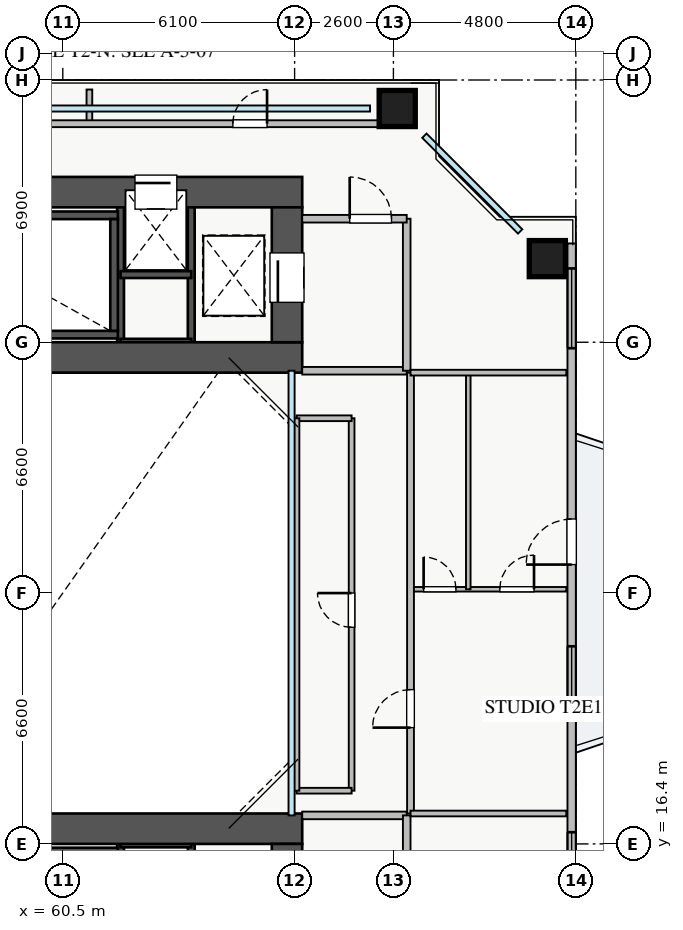
"""IFC4 building model, lengths in metres.
Left out: names, types, materials, properties, quantities, classifications, styles, units other than length and angle.
Written with IfcOpenShell. Run it as: python <this file> out.ifc"""

import sys

from ifc_helpers import new_model, si_unit, direction, frame, frame_2d, origin, origin_2d, place, context, subcontext, project, spatial, rectangle, extrude, source, transform, mapped, element, fill, save


model = new_model("IFC4")
c1 = context("Model", 3, precision=1e-05, world=origin(), true_north=direction((0.0, 1.0)))
c2 = subcontext(c1, "Body", "Model", "MODEL_VIEW")
j1 = project(units=[si_unit("LENGTHUNIT", "METRE"), si_unit("PLANEANGLEUNIT", "RADIAN")], contexts=[c1])
p1 = place(None, origin())
s1 = spatial("IfcSite", under=j1, at=p1, CompositionType="ELEMENT")
p2 = place(p1, origin())
s2 = spatial("IfcBuilding", under=s1, at=p2, CompositionType="ELEMENT")
p3 = place(p2, frame((0.0, 0.0, 50.25)))
s3 = spatial("IfcBuildingStorey", under=s2, at=p3, CompositionType="ELEMENT", Elevation=50.25)
for number, where, z_axis, x_axis in (
    (1, (62.02, 29.6, 0.0), (0.0, 0.0, 1.0), (0.0, 1.0, 0.0)),
    (2, (63.88, 29.6, 0.0), (0.0, 0.0, 1.0), (0.0, 1.0, 0.0)),
):
    element("IfcWall", number, at=place(p3, frame(where, z_axis=z_axis, x_axis=x_axis)), inside=s3, PredefinedType="SHEAR", context=c2, shape_type="SweptSolid", body=[
        extrude(rectangle(XDim=3.95, YDim=0.18, at=frame_2d((1.975, 0.0))), origin(), (0.0, 0.0, 1.0), 3.07),
    ])
for number, where, z_axis, x_axis in (
    (3, (62.02, 31.38, 0.0), (0.0, 0.0, 1.0), (1.0, 0.0, 0.0)),
    (4, (62.02, 29.6, 0.0), (0.0, 0.0, 1.0), (1.0, 0.0, 0.0)),
):
    element("IfcWall", number, at=place(p3, frame(where, z_axis=z_axis, x_axis=x_axis)), inside=s3, PredefinedType="SHEAR", context=c2, shape_type="SweptSolid", body=[
        extrude(rectangle(XDim=1.86, YDim=0.18, at=frame_2d((0.93, 0.0))), origin(), (0.0, 0.0, 1.0), 3.07),
    ])
for number, where, z_axis, x_axis in (
    (5, (62.02, 12.45, 0.0), (0.0, 0.0, 1.0), (0.0, 1.0, 0.0)),
    (6, (63.88, 12.45, 0.0), (0.0, 0.0, 1.0), (0.0, 1.0, 0.0)),
):
    element("IfcWall", number, at=place(p3, frame(where, z_axis=z_axis, x_axis=x_axis)), inside=s3, PredefinedType="SHEAR", context=c2, shape_type="SweptSolid", body=[
        extrude(rectangle(XDim=3.95, YDim=0.18, at=frame_2d((1.975, 0.0))), origin(), (0.0, 0.0, 1.0), 3.07),
    ])
p4 = place(p3, frame((62.02, 16.4, 0.0), z_axis=(0.0, 0.0, 1.0), x_axis=(1.0, 0.0, 0.0)))
e7 = element("IfcWall", 7, at=p4, inside=s3, PredefinedType="SHEAR", context=c2, shape_type="SweptSolid", body=[
    extrude(rectangle(XDim=1.86, YDim=0.18, at=frame_2d((0.93, 0.0))), origin(), (0.0, 0.0, 1.0), 3.07),
])
for number, where, z_axis, x_axis in (
    (8, (54.8, 29.8, 0.0), (0.0, 0.0, 1.0), (1.0, 0.0, 0.0)),
    (9, (54.8, 32.94, 0.0), (0.0, 0.0, 1.0), (1.0, 0.0, 0.0)),
):
    element("IfcWall", number, at=place(p3, frame(where, z_axis=z_axis, x_axis=x_axis)), inside=s3, PredefinedType="SHEAR", context=c2, shape_type="SweptSolid", body=[
        extrude(rectangle(XDim=7.15, YDim=0.2, at=frame_2d((3.575, 0.0))), origin(), (0.0, 0.0, 1.0), 3.25),
    ])
p5 = place(p3, frame((61.85, 29.9, 0.0), z_axis=(0.0, 0.0, 1.0), x_axis=(0.0, 1.0, 0.0)))
e10 = element("IfcWall", 10, at=p5, inside=s3, PredefinedType="SHEAR", context=c2, shape_type="SweptSolid", body=[
    extrude(rectangle(XDim=2.94, YDim=0.2, at=frame_2d((1.47, 0.0))), origin(), (0.0, 0.0, 1.0), 3.25),
])
p6 = place(p3, frame((54.8, 16.2, 0.0), z_axis=(0.0, 0.0, 1.0), x_axis=(1.0, 0.0, 0.0)))
e11 = element("IfcWall", 11, at=p6, inside=s3, PredefinedType="SHEAR", context=c2, shape_type="SweptSolid", body=[
    extrude(rectangle(XDim=7.15, YDim=0.2, at=frame_2d((3.575, 0.0))), origin(), (0.0, 0.0, 1.0), 3.25),
])
p7 = place(p3, frame((54.2, 29.2, 0.0), z_axis=(0.0, 0.0, 1.0), x_axis=(1.0, 0.0, 0.0)))
e12 = element("IfcWall", 12, at=p7, inside=s3, PredefinedType="SHEAR", context=c2, shape_type="SweptSolid", body=[
    extrude(rectangle(XDim=12.6, YDim=0.8, at=frame_2d((6.3, 0.0))), origin(), (0.0, 0.0, 1.0), 3.25),
])
p8 = place(p3, frame((54.2, 33.55, 0.0), z_axis=(0.0, 0.0, 1.0), x_axis=(1.0, 0.0, 0.0)))
e13 = element("IfcWall", 13, at=p8, inside=s3, PredefinedType="SHEAR", context=c2, shape_type="SweptSolid", body=[
    extrude(rectangle(XDim=12.6, YDim=0.8, at=frame_2d((6.3, 0.0))), origin(), (0.0, 0.0, 1.0), 3.25),
])
p9 = place(p8, frame((8.2, 0.0, 0.0)))
e14 = element("IfcOpeningElement", 14, at=p9, cuts=e13, PredefinedType="OPENING", context=c2, shape_type="SweptSolid", body=[
    extrude(rectangle(XDim=1.1, YDim=2.05, at=frame_2d((0.55, 1.025))), frame((0.0, 0.41, 0.0), z_axis=(0.0, -1.0, 0.0), x_axis=(1.0, 0.0, 0.0)), (0.0, 0.0, 1.0), 0.82),
])
p10 = place(p3, frame((66.4, 29.6, 0.0), z_axis=(0.0, 0.0, 1.0), x_axis=(0.0, 1.0, 0.0)))
e15 = element("IfcWall", 15, at=p10, inside=s3, PredefinedType="SHEAR", context=c2, shape_type="SweptSolid", body=[
    extrude(rectangle(XDim=3.55, YDim=0.8, at=frame_2d((1.775, 0.0))), origin(), (0.0, 0.0, 1.0), 3.25),
])
p11 = place(p10, frame((1.05, 0.0, 0.0)))
e16 = element("IfcOpeningElement", 16, at=p11, cuts=e15, PredefinedType="OPENING", context=c2, shape_type="SweptSolid", body=[
    extrude(rectangle(XDim=1.3, YDim=2.05, at=frame_2d((0.65, 1.025))), frame((0.0, 0.41, 0.0), z_axis=(0.0, -1.0, 0.0), x_axis=(1.0, 0.0, 0.0)), (0.0, 0.0, 1.0), 0.82),
])
p12 = place(p3, frame((54.2, 16.8, 0.0), z_axis=(0.0, 0.0, 1.0), x_axis=(1.0, 0.0, 0.0)))
e17 = element("IfcWall", 17, at=p12, inside=s3, PredefinedType="SHEAR", context=c2, shape_type="SweptSolid", body=[
    extrude(rectangle(XDim=12.6, YDim=0.8, at=frame_2d((6.3, 0.0))), origin(), (0.0, 0.0, 1.0), 3.25),
])
p13 = place(p3, frame((66.4, 12.85, 0.0), z_axis=(0.0, 0.0, 1.0), x_axis=(0.0, 1.0, 0.0)))
e18 = element("IfcWall", 18, at=p13, inside=s3, PredefinedType="SHEAR", context=c2, shape_type="SweptSolid", body=[
    extrude(rectangle(XDim=3.55, YDim=0.8, at=frame_2d((1.775, 0.0))), origin(), (0.0, 0.0, 1.0), 3.25),
])
p14 = place(p13, frame((1.05, 0.0, 0.0)))
e19 = element("IfcOpeningElement", 19, at=p14, cuts=e18, PredefinedType="OPENING", context=c2, shape_type="SweptSolid", body=[
    extrude(rectangle(XDim=1.3, YDim=2.05, at=frame_2d((0.65, 1.025))), frame((0.0, 0.41, 0.0), z_axis=(0.0, -1.0, 0.0), x_axis=(1.0, 0.0, 0.0)), (0.0, 0.0, 1.0), 0.82),
])
m1 = source(origin(), c2, "Body", "SweptSolid", [
    extrude(rectangle(XDim=0.95, YDim=0.95, at=origin_2d()), origin(), (0.0, 0.0, 1.0), 3.25),
])
for number, where, z_axis, x_axis in (
    (20, (73.25, 31.8, 0.0), (0.0, 0.0, 1.0), (1.0, 0.0, 0.0)),
    (21, (69.3, 35.75, 0.0), (0.0, 0.0, 1.0), (1.0, 0.0, 0.0)),
):
    element("IfcColumn", number, at=place(p3, frame(where, z_axis=z_axis, x_axis=x_axis)), inside=s3, PredefinedType="COLUMN", context=c2, shape_type="MappedRepresentation", body=[
        mapped(m1, transform((0.0, 0.0, 0.0), x_axis=(1.0, 0.0, 0.0), y_axis=(0.0, 1.0, 0.0), z_axis=(0.0, 0.0, 1.0), scale=1.0)),
    ])
p15 = place(p3, frame((73.89, 13.8, 0.0), z_axis=(0.0, 0.0, 1.0), x_axis=(0.0, 1.0, 0.0)))
e22 = element("IfcWall", 22, at=p15, inside=s3, PredefinedType="STANDARD", context=c2, shape_type="SweptSolid", body=[
    extrude(rectangle(XDim=18.4, YDim=0.22, at=frame_2d((9.2, 0.0))), origin(), (0.0, 0.0, 1.0), 2.61),
])
p16 = place(p15, frame((9.95, 0.0, 0.0)))
e23 = element("IfcOpeningElement", 23, at=p16, cuts=e22, PredefinedType="OPENING", context=c2, shape_type="SweptSolid", body=[
    extrude(rectangle(XDim=1.2, YDim=2.1, at=frame_2d((0.6, 1.05))), frame((0.0, 0.12, 0.0), z_axis=(0.0, -1.0, 0.0), x_axis=(1.0, 0.0, 0.0)), (0.0, 0.0, 1.0), 0.24),
])
p17 = place(p15, frame((0.508, 0.0, 0.9)))
e24 = element("IfcOpeningElement", 24, at=p17, cuts=e22, PredefinedType="OPENING", context=c2, shape_type="SweptSolid", body=[
    extrude(rectangle(XDim=2.4, YDim=1.5, at=frame_2d((1.2, 0.75))), frame((0.0, 0.12, 0.0), z_axis=(0.0, -1.0, 0.0), x_axis=(1.0, 0.0, 0.0)), (0.0, 0.0, 1.0), 0.24),
])
p18 = place(p15, frame((6.0, 0.0, 0.9)))
e25 = element("IfcOpeningElement", 25, at=p18, cuts=e22, PredefinedType="OPENING", context=c2, shape_type="SweptSolid", body=[
    extrude(rectangle(XDim=1.8, YDim=1.45, at=frame_2d((0.9, 0.725))), frame((0.0, 0.12, 0.0), z_axis=(0.0, -1.0, 0.0), x_axis=(1.0, 0.0, 0.0)), (0.0, 0.0, 1.0), 0.24),
])
p19 = place(p15, frame((15.643, 0.0, 0.9)))
e26 = element("IfcOpeningElement", 26, at=p19, cuts=e22, PredefinedType="OPENING", context=c2, shape_type="SweptSolid", body=[
    extrude(rectangle(XDim=2.1, YDim=1.5, at=frame_2d((1.05, 0.75))), frame((0.0, 0.12, 0.0), z_axis=(0.0, -1.0, 0.0), x_axis=(1.0, 0.0, 0.0)), (0.0, 0.0, 1.0), 0.24),
])
p20 = place(p3, frame((66.8, 28.85, 0.0), z_axis=(0.0, 0.0, 1.0), x_axis=(1.0, 0.0, 0.0)))
e27 = element("IfcWall", 27, at=p20, inside=s3, PredefinedType="PARTITIONING", context=c2, shape_type="SweptSolid", body=[
    extrude(rectangle(XDim=2.75, YDim=0.2, at=frame_2d((1.375, 0.0))), origin(), (0.0, 0.0, 1.0), 3.07),
])
p21 = place(p3, frame((69.55, 28.85, 0.0), z_axis=(0.0, 0.0, 1.0), x_axis=(0.0, 1.0, 0.0)))
e28 = element("IfcWall", 28, at=p21, inside=s3, PredefinedType="PARTITIONING", context=c2, shape_type="SweptSolid", body=[
    extrude(rectangle(XDim=4.0, YDim=0.2, at=frame_2d((2.0, 0.0))), origin(), (0.0, 0.0, 1.0), 2.615),
])
p22 = place(p3, frame((66.8, 32.85, 0.0), z_axis=(0.0, 0.0, 1.0), x_axis=(1.0, 0.0, 0.0)))
e29 = element("IfcWall", 29, at=p22, inside=s3, PredefinedType="PARTITIONING", context=c2, shape_type="SweptSolid", body=[
    extrude(rectangle(XDim=2.75, YDim=0.2, at=frame_2d((1.375, 0.0))), origin(), (0.0, 0.0, 1.0), 3.07),
])
p23 = place(p22, frame((1.25, 0.0, 0.0)))
e30 = element("IfcOpeningElement", 30, at=p23, cuts=e29, PredefinedType="OPENING", context=c2, shape_type="SweptSolid", body=[
    extrude(rectangle(XDim=1.1, YDim=2.05, at=frame_2d((0.55, 1.025))), frame((0.0, 0.11, 0.0), z_axis=(0.0, -1.0, 0.0), x_axis=(1.0, 0.0, 0.0)), (0.0, 0.0, 1.0), 0.22),
])
p24 = place(p3, frame((66.8, 17.15, 0.0), z_axis=(0.0, 0.0, 1.0), x_axis=(1.0, 0.0, 0.0)))
e31 = element("IfcWall", 31, at=p24, inside=s3, PredefinedType="PARTITIONING", context=c2, shape_type="SweptSolid", body=[
    extrude(rectangle(XDim=2.75, YDim=0.2, at=frame_2d((1.375, 0.0))), origin(), (0.0, 0.0, 1.0), 3.07),
])
p25 = place(p3, frame((69.55, 13.15, 0.0), z_axis=(0.0, 0.0, 1.0), x_axis=(0.0, 1.0, 0.0)))
e32 = element("IfcWall", 32, at=p25, inside=s3, PredefinedType="PARTITIONING", context=c2, shape_type="SweptSolid", body=[
    extrude(rectangle(XDim=4.0, YDim=0.2, at=frame_2d((2.0, 0.0))), origin(), (0.0, 0.0, 1.0), 2.615),
])
p26 = place(p3, frame((69.65, 23.1, 0.0), z_axis=(0.0, 0.0, 1.0), x_axis=(1.0, 0.0, 0.0)))
e33 = element("IfcWall", 33, at=p26, inside=s3, PredefinedType="PLUMBINGWALL", context=c2, shape_type="SweptSolid", body=[
    extrude(rectangle(XDim=4.1, YDim=0.12, at=frame_2d((2.05, 0.0))), origin(), (0.0, 0.0, 1.0), 2.821),
])
p27 = place(p26, frame((0.345, 0.0, 0.0)))
e34 = element("IfcOpeningElement", 34, at=p27, cuts=e33, PredefinedType="OPENING", context=c2, shape_type="SweptSolid", body=[
    extrude(rectangle(XDim=0.85, YDim=2.05, at=frame_2d((0.425, 1.025))), frame((0.0, 0.07, 0.0), z_axis=(0.0, -1.0, 0.0), x_axis=(1.0, 0.0, 0.0)), (0.0, 0.0, 1.0), 0.14),
])
p28 = place(p26, frame((2.35, 0.0, 0.0)))
e35 = element("IfcOpeningElement", 35, at=p28, cuts=e33, PredefinedType="OPENING", context=c2, shape_type="SweptSolid", body=[
    extrude(rectangle(XDim=0.9, YDim=2.05, at=frame_2d((0.45, 1.025))), frame((0.0, 0.07, 0.0), z_axis=(0.0, -1.0, 0.0), x_axis=(1.0, 0.0, 0.0)), (0.0, 0.0, 1.0), 0.14),
])
p29 = place(p3, frame((71.17, 23.1, 0.0), z_axis=(0.0, 0.0, 1.0), x_axis=(0.0, 1.0, 0.0)))
e36 = element("IfcWall", 36, at=p29, inside=s3, PredefinedType="PLUMBINGWALL", context=c2, shape_type="SweptSolid", body=[
    extrude(rectangle(XDim=5.7, YDim=0.12, at=frame_2d((2.85, 0.0))), origin(), (0.0, 0.0, 1.0), 3.07),
])
p30 = place(p3, frame((69.65, 17.2, 0.0), z_axis=(0.0, 0.0, 1.0), x_axis=(0.0, 1.0, 0.0)))
e37 = element("IfcWall", 37, at=p30, inside=s3, PredefinedType="PARTITIONING", context=c2, shape_type="SweptSolid", body=[
    extrude(rectangle(XDim=11.6, YDim=0.18, at=frame_2d((5.8, 0.0))), origin(), (0.0, 0.0, 1.0), 3.07),
])
p31 = place(p30, frame((2.26, 0.0, 0.0)))
e38 = element("IfcOpeningElement", 38, at=p31, cuts=e37, PredefinedType="OPENING", context=c2, shape_type="SweptSolid", body=[
    extrude(rectangle(XDim=1.0, YDim=2.05, at=frame_2d((0.5, 1.025))), frame((0.0, 0.1, 0.0), z_axis=(0.0, -1.0, 0.0), x_axis=(1.0, 0.0, 0.0)), (0.0, 0.0, 1.0), 0.2),
])
for number, where, z_axis, x_axis in (
    (39, (69.65, 17.2, 0.0), (0.0, 0.0, 1.0), (1.0, 0.0, 0.0)),
    (40, (69.65, 28.8, 0.0), (0.0, 0.0, 1.0), (1.0, 0.0, 0.0)),
):
    element("IfcWall", number, at=place(p3, frame(where, z_axis=z_axis, x_axis=x_axis)), inside=s3, PredefinedType="PARTITIONING", context=c2, shape_type="SweptSolid", body=[
        extrude(rectangle(XDim=4.1, YDim=0.15, at=frame_2d((2.05, 0.0))), origin(), (0.0, 0.0, 1.0), 3.07),
    ])
p32 = place(p3, frame((68.1, 17.8, 0.0), z_axis=(0.0, 0.0, 1.0), x_axis=(0.0, 1.0, 0.0)))
e41 = element("IfcWall", 41, at=p32, inside=s3, PredefinedType="PARTITIONING", context=c2, shape_type="SweptSolid", body=[
    extrude(rectangle(XDim=9.8, YDim=0.15, at=frame_2d((4.9, 0.0))), origin(), (0.0, 0.0, 1.0), 3.07),
])
p33 = place(p32, frame((4.3, 0.0, 0.0)))
e42 = element("IfcOpeningElement", 42, at=p33, cuts=e41, PredefinedType="OPENING", context=c2, shape_type="SweptSolid", body=[
    extrude(rectangle(XDim=0.9, YDim=2.05, at=frame_2d((0.45, 1.025))), frame((0.0, 0.085, 0.0), z_axis=(0.0, -1.0, 0.0), x_axis=(1.0, 0.0, 0.0)), (0.0, 0.0, 1.0), 0.17),
])
p34 = place(p3, frame((66.65, 27.6, 0.0), z_axis=(0.0, 0.0, 1.0), x_axis=(1.0, 0.0, 0.0)))
e43 = element("IfcWall", 43, at=p34, inside=s3, PredefinedType="PARTITIONING", context=c2, shape_type="SweptSolid", body=[
    extrude(rectangle(XDim=1.45, YDim=0.15, at=frame_2d((0.725, 0.0))), origin(), (0.0, 0.0, 1.0), 2.821),
])
p35 = place(p3, frame((66.65, 17.8, 0.0), z_axis=(0.0, 0.0, 1.0), x_axis=(1.0, 0.0, 0.0)))
e44 = element("IfcWall", 44, at=p35, inside=s3, PredefinedType="PARTITIONING", context=c2, shape_type="SweptSolid", body=[
    extrude(rectangle(XDim=1.45, YDim=0.15, at=frame_2d((0.725, 0.0))), origin(), (0.0, 0.0, 1.0), 3.07),
])
p36 = place(p3, frame((66.65, 17.8, 0.0), z_axis=(0.0, 0.0, 1.0), x_axis=(0.0, 1.0, 0.0)))
e45 = element("IfcWall", 45, at=p36, inside=s3, PredefinedType="PARTITIONING", context=c2, shape_type="SweptSolid", body=[
    extrude(rectangle(XDim=9.8, YDim=0.15, at=frame_2d((4.9, 0.0))), origin(), (0.0, 0.0, 1.0), 2.665),
])
for number, where, z_axis, x_axis in (
    (46, (61.2, 35.35, 0.0), (0.0, 0.0, 1.0), (0.0, 1.0, 0.0)),
    (47, (69.65, 35.35, 0.0), (0.0, 0.0, 1.0), (0.0, 1.0, 0.0)),
):
    element("IfcWall", number, at=place(p3, frame(where, z_axis=z_axis, x_axis=x_axis)), inside=s3, PredefinedType="PARTITIONING", context=c2, shape_type="SweptSolid", body=[
        extrude(rectangle(XDim=0.9, YDim=0.15, at=frame_2d((0.45, 0.0))), origin(), (0.0, 0.0, 1.0), 3.07),
    ])
p37 = place(p3, frame((52.65, 35.35, 0.0), z_axis=(0.0, 0.0, 1.0), x_axis=(1.0, 0.0, 0.0)))
e48 = element("IfcWall", 48, at=p37, inside=s3, PredefinedType="PARTITIONING", context=c2, shape_type="SweptSolid", body=[
    extrude(rectangle(XDim=17.0, YDim=0.18, at=frame_2d((8.5, 0.0))), origin(), (0.0, 0.0, 1.0), 3.07),
])
p38 = place(p37, frame((3.825, 0.0, 0.0)))
e49 = element("IfcOpeningElement", 49, at=p38, cuts=e48, PredefinedType="OPENING", context=c2, shape_type="SweptSolid", body=[
    extrude(rectangle(XDim=0.9, YDim=2.05, at=frame_2d((0.45, 1.025))), frame((0.0, 0.1, 0.0), z_axis=(0.0, -1.0, 0.0), x_axis=(1.0, 0.0, 0.0)), (0.0, 0.0, 1.0), 0.2),
])
p39 = place(p37, frame((12.325, 0.0, 0.0)))
e50 = element("IfcOpeningElement", 50, at=p39, cuts=e48, PredefinedType="OPENING", context=c2, shape_type="SweptSolid", body=[
    extrude(rectangle(XDim=0.9, YDim=2.05, at=frame_2d((0.45, 1.025))), frame((0.0, 0.1, 0.0), z_axis=(0.0, -1.0, 0.0), x_axis=(1.0, 0.0, 0.0)), (0.0, 0.0, 1.0), 0.2),
])
m2 = source(origin(), c2, "Body", "SweptSolid", [
    extrude(rectangle(XDim=1.2, YDim=2.1, at=frame_2d((0.6, 1.05))), frame((0.0, 0.025, 0.0), z_axis=(0.0, -1.0, 0.0), x_axis=(1.0, 0.0, 0.0)), (0.0, 0.0, 1.0), 0.05),
])
p40 = place(p16, origin())
e51 = element("IfcDoor", 51, at=p40, inside=s3, OperationType="SINGLE_SWING_LEFT", PredefinedType="DOOR", context=c2, shape_type="MappedRepresentation", body=[
    mapped(m2, transform((0.0, 0.0, 0.0), x_axis=(1.0, 0.0, 0.0), y_axis=(0.0, 1.0, 0.0), z_axis=(0.0, 0.0, 1.0), scale=1.0)),
])
fill(e23, e51)
m3 = source(origin(), c2, "Body", "SweptSolid", [
    extrude(rectangle(XDim=2.4, YDim=1.5, at=frame_2d((1.2, 0.75))), frame((0.0, 0.03, 0.0), z_axis=(0.0, -1.0, 0.0), x_axis=(1.0, 0.0, 0.0)), (0.0, 0.0, 1.0), 0.06),
])
p41 = place(p17, origin())
e52 = element("IfcWindow", 52, at=p41, inside=s3, PartitioningType="TRIPLE_PANEL_VERTICAL", PredefinedType="WINDOW", context=c2, shape_type="MappedRepresentation", body=[
    mapped(m3, transform((0.0, 0.0, 0.0), x_axis=(1.0, 0.0, 0.0), y_axis=(0.0, 1.0, 0.0), z_axis=(0.0, 0.0, 1.0), scale=1.0)),
])
fill(e24, e52)
m4 = source(origin(), c2, "Body", "SweptSolid", [
    extrude(rectangle(XDim=1.8, YDim=1.45, at=frame_2d((0.9, 0.725))), frame((0.0, 0.03, 0.0), z_axis=(0.0, -1.0, 0.0), x_axis=(1.0, 0.0, 0.0)), (0.0, 0.0, 1.0), 0.06),
])
p42 = place(p18, origin())
e53 = element("IfcWindow", 53, at=p42, inside=s3, PartitioningType="DOUBLE_PANEL_VERTICAL", PredefinedType="WINDOW", context=c2, shape_type="MappedRepresentation", body=[
    mapped(m4, transform((0.0, 0.0, 0.0), x_axis=(1.0, 0.0, 0.0), y_axis=(0.0, 1.0, 0.0), z_axis=(0.0, 0.0, 1.0), scale=1.0)),
])
fill(e25, e53)
m5 = source(origin(), c2, "Body", "SweptSolid", [
    extrude(rectangle(XDim=2.1, YDim=1.5, at=frame_2d((1.05, 0.75))), frame((0.0, 0.03, 0.0), z_axis=(0.0, -1.0, 0.0), x_axis=(1.0, 0.0, 0.0)), (0.0, 0.0, 1.0), 0.06),
])
p43 = place(p19, origin())
e54 = element("IfcWindow", 54, at=p43, inside=s3, PartitioningType="TRIPLE_PANEL_VERTICAL", PredefinedType="WINDOW", context=c2, shape_type="MappedRepresentation", body=[
    mapped(m5, transform((0.0, 0.0, 0.0), x_axis=(1.0, 0.0, 0.0), y_axis=(0.0, 1.0, 0.0), z_axis=(0.0, 0.0, 1.0), scale=1.0)),
])
fill(e26, e54)
m6 = source(origin(), c2, "Body", "SweptSolid", [
    extrude(rectangle(XDim=1.3, YDim=2.05, at=frame_2d((0.65, 1.025))), frame((0.0, 0.025, 0.0), z_axis=(0.0, -1.0, 0.0), x_axis=(1.0, 0.0, 0.0)), (0.0, 0.0, 1.0), 0.05),
])
p44 = place(p11, origin())
e55 = element("IfcDoor", 55, at=p44, inside=s3, OperationType="SLIDING_TO_LEFT", PredefinedType="DOOR", context=c2, shape_type="MappedRepresentation", body=[
    mapped(m6, transform((0.0, 0.0, 0.0), x_axis=(1.0, 0.0, 0.0), y_axis=(0.0, 1.0, 0.0), z_axis=(0.0, 0.0, 1.0), scale=1.0)),
])
fill(e16, e55)
m7 = source(origin(), c2, "Body", "SweptSolid", [
    extrude(rectangle(XDim=1.1, YDim=2.05, at=frame_2d((0.55, 1.025))), frame((0.0, 0.025, 0.0), z_axis=(0.0, -1.0, 0.0), x_axis=(1.0, 0.0, 0.0)), (0.0, 0.0, 1.0), 0.05),
])
p45 = place(p9, origin())
e56 = element("IfcDoor", 56, at=p45, inside=s3, OperationType="SLIDING_TO_LEFT", PredefinedType="DOOR", context=c2, shape_type="MappedRepresentation", body=[
    mapped(m7, transform((0.0, 0.0, 0.0), x_axis=(1.0, 0.0, 0.0), y_axis=(0.0, 1.0, 0.0), z_axis=(0.0, 0.0, 1.0), scale=1.0)),
])
fill(e14, e56)
p46 = place(p23, origin())
e57 = element("IfcDoor", 57, at=p46, inside=s3, OperationType="SINGLE_SWING_LEFT", PredefinedType="DOOR", context=c2, shape_type="MappedRepresentation", body=[
    mapped(m7, transform((0.0, 0.0, 0.0), x_axis=(1.0, 0.0, 0.0), y_axis=(0.0, 1.0, 0.0), z_axis=(0.0, 0.0, 1.0), scale=1.0)),
])
fill(e30, e57)
m8 = source(origin(), c2, "Body", "SweptSolid", [
    extrude(rectangle(XDim=0.85, YDim=2.05, at=frame_2d((0.425, 1.025))), frame((0.0, 0.025, 0.0), z_axis=(0.0, -1.0, 0.0), x_axis=(1.0, 0.0, 0.0)), (0.0, 0.0, 1.0), 0.05),
])
p47 = place(p27, origin())
e58 = element("IfcDoor", 58, at=p47, inside=s3, OperationType="SINGLE_SWING_LEFT", PredefinedType="DOOR", context=c2, shape_type="MappedRepresentation", body=[
    mapped(m8, transform((0.0, 0.0, 0.0), x_axis=(1.0, 0.0, 0.0), y_axis=(0.0, 1.0, 0.0), z_axis=(0.0, 0.0, 1.0), scale=1.0)),
])
fill(e34, e58)
m9 = source(origin(), c2, "Body", "SweptSolid", [
    extrude(rectangle(XDim=0.9, YDim=2.05, at=frame_2d((0.45, 1.025))), frame((0.0, 0.025, 0.0), z_axis=(0.0, -1.0, 0.0), x_axis=(1.0, 0.0, 0.0)), (0.0, 0.0, 1.0), 0.05),
])
p48 = place(p28, origin())
e59 = element("IfcDoor", 59, at=p48, inside=s3, OperationType="SINGLE_SWING_RIGHT", PredefinedType="DOOR", context=c2, shape_type="MappedRepresentation", body=[
    mapped(m9, transform((0.0, 0.0, 0.0), x_axis=(1.0, 0.0, 0.0), y_axis=(0.0, 1.0, 0.0), z_axis=(0.0, 0.0, 1.0), scale=1.0)),
])
fill(e35, e59)
m10 = source(origin(), c2, "Body", "SweptSolid", [
    extrude(rectangle(XDim=1.0, YDim=2.05, at=frame_2d((0.5, 1.025))), frame((0.0, 0.025, 0.0), z_axis=(0.0, -1.0, 0.0), x_axis=(1.0, 0.0, 0.0)), (0.0, 0.0, 1.0), 0.05),
])
p49 = place(p31, origin())
e60 = element("IfcDoor", 60, at=p49, inside=s3, OperationType="SINGLE_SWING_LEFT", PredefinedType="DOOR", context=c2, shape_type="MappedRepresentation", body=[
    mapped(m10, transform((0.0, 0.0, 0.0), x_axis=(1.0, 0.0, 0.0), y_axis=(0.0, 1.0, 0.0), z_axis=(0.0, 0.0, 1.0), scale=1.0)),
])
fill(e38, e60)
p50 = place(p33, origin())
e61 = element("IfcDoor", 61, at=p50, inside=s3, OperationType="SINGLE_SWING_RIGHT", PredefinedType="DOOR", context=c2, shape_type="MappedRepresentation", body=[
    mapped(m9, transform((0.0, 0.0, 0.0), x_axis=(1.0, 0.0, 0.0), y_axis=(0.0, 1.0, 0.0), z_axis=(0.0, 0.0, 1.0), scale=1.0)),
])
fill(e42, e61)
p51 = place(p39, origin())
e62 = element("IfcDoor", 62, at=p51, inside=s3, OperationType="SINGLE_SWING_RIGHT", PredefinedType="DOOR", context=c2, shape_type="MappedRepresentation", body=[
    mapped(m9, transform((0.0, 0.0, 0.0), x_axis=(1.0, 0.0, 0.0), y_axis=(0.0, 1.0, 0.0), z_axis=(0.0, 0.0, 1.0), scale=1.0)),
])
fill(e50, e62)
save(model, sys.argv[1])
